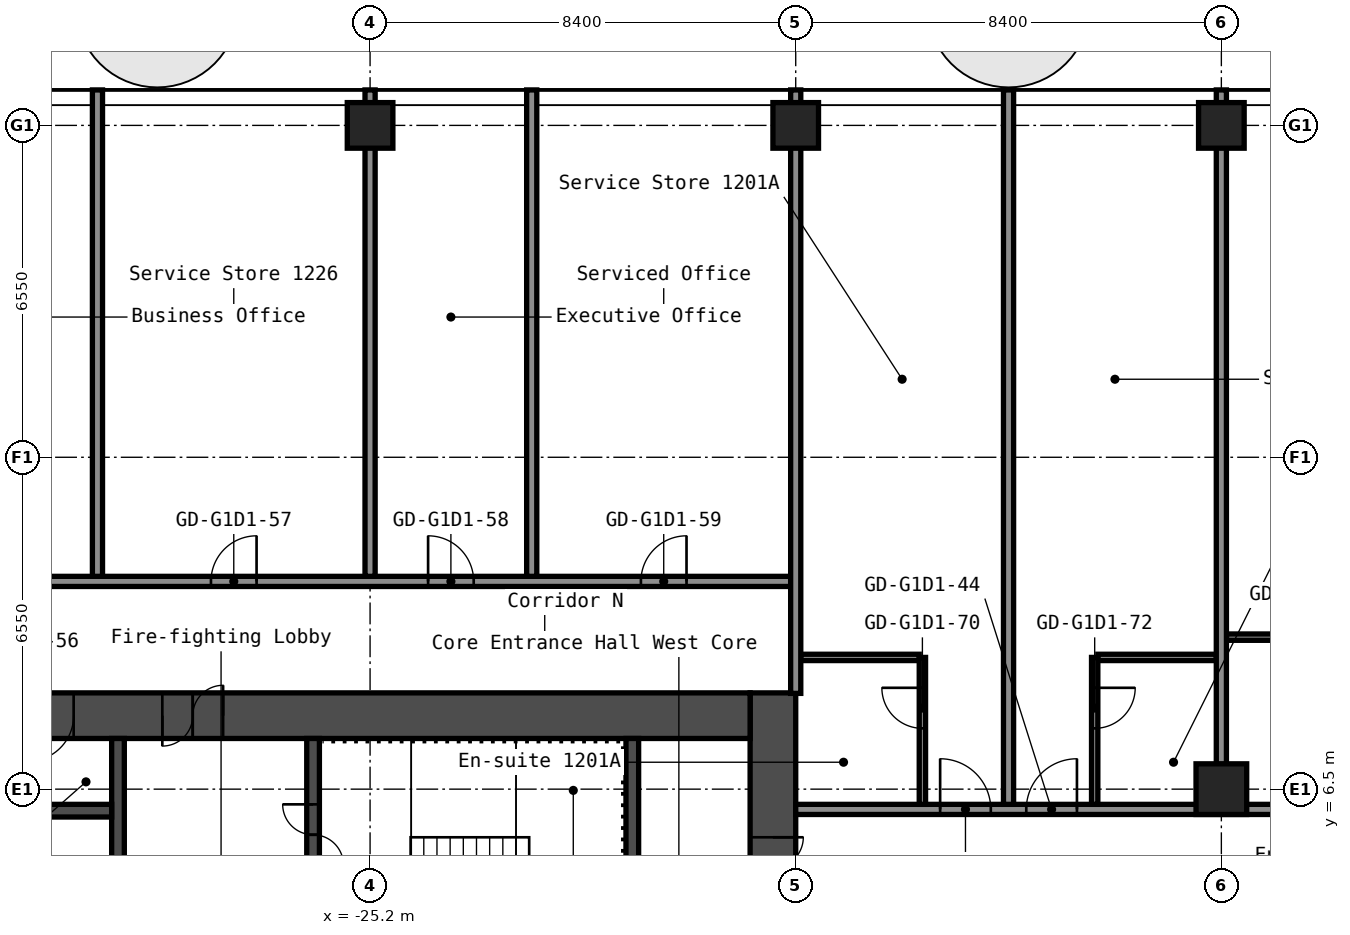
"""IFC4 building model, lengths in metres.
Left out: names, types, materials, properties, quantities, classifications, styles, units other than length and angle.
Written with IfcOpenShell. Run it as: python <this file> out.ifc"""

import sys

from ifc_helpers import new_model, si_unit, direction, frame, frame_2d, origin, origin_2d, place, context, subcontext, project, spatial, rectangle, hollow_rectangle, extrude, element, fill, save


model = new_model("IFC4")
c1 = context("Model", 3, precision=1e-05, world=origin(), true_north=direction((0.0, 1.0)))
c2 = subcontext(c1, "Body", "Model", "MODEL_VIEW")
j1 = project(units=[si_unit("LENGTHUNIT", "METRE"), si_unit("PLANEANGLEUNIT", "RADIAN")], contexts=[c1])
p1 = place(None, origin())
s1 = spatial("IfcSite", under=j1, at=p1, CompositionType="ELEMENT")
p2 = place(p1, origin())
s2 = spatial("IfcBuilding", under=s1, at=p2, CompositionType="ELEMENT")
p3 = place(p2, frame((0.0, 0.0, 45.4)))
s3 = spatial("IfcBuildingStorey", under=s2, at=p3, CompositionType="ELEMENT", Elevation=45.4)
for number, where, z_axis, x_axis in (
    (1, (-25.2, 19.6, 0.0), (0.0, 0.0, 1.0), (1.0, 0.0, 0.0)),
    (2, (-16.8, 19.6, 0.0), (0.0, 0.0, 1.0), (1.0, 0.0, 0.0)),
):
    element("IfcColumn", number, at=place(p3, frame(where, z_axis=z_axis, x_axis=x_axis)), inside=s3, PredefinedType="COLUMN", context=c2, shape_type="SweptSolid", body=[
        extrude(hollow_rectangle(XDim=0.9, YDim=0.9, WallThickness=0.036, at=origin_2d()), origin(), (0.0, 0.0, 1.0), 2.8),
    ])
p4 = place(p3, frame((-8.4, 6.5, 0.0), z_axis=(0.0, 0.0, 1.0), x_axis=(1.0, 0.0, 0.0)))
e3 = element("IfcColumn", 3, at=p4, inside=s3, PredefinedType="COLUMN", context=c2, shape_type="SweptSolid", body=[
    extrude(hollow_rectangle(XDim=1.0, YDim=1.0, WallThickness=0.04, at=origin_2d()), origin(), (0.0, 0.0, 1.0), 2.8),
])
p5 = place(p3, frame((-8.4, 19.6, 0.0), z_axis=(0.0, 0.0, 1.0), x_axis=(1.0, 0.0, 0.0)))
e4 = element("IfcColumn", 4, at=p5, inside=s3, PredefinedType="COLUMN", context=c2, shape_type="SweptSolid", body=[
    extrude(hollow_rectangle(XDim=0.9, YDim=0.9, WallThickness=0.036, at=origin_2d()), origin(), (0.0, 0.0, 1.0), 2.8),
])
p6 = place(p3, frame((-17.25, -8.4, 0.0), z_axis=(0.0, 0.0, 1.0), x_axis=(0.0, 1.0, 0.0)))
e5 = element("IfcWall", 5, at=p6, inside=s3, PredefinedType="SHEAR", context=c2, shape_type="SweptSolid", body=[
    extrude(rectangle(XDim=16.8, YDim=0.9, at=frame_2d((8.4, 0.0))), origin(), (0.0, 0.0, 1.0), 2.8),
])
p7 = place(p6, frame((12.75, 0.0, 0.0)))
e6 = element("IfcOpeningElement", 6, at=p7, cuts=e5, PredefinedType="OPENING", context=c2, shape_type="SweptSolid", body=[
    extrude(rectangle(XDim=1.2, YDim=2.1, at=frame_2d((0.6, 1.05))), frame((0.0, 0.46, 0.0), z_axis=(0.0, -1.0, 0.0), x_axis=(1.0, 0.0, 0.0)), (0.0, 0.0, 1.0), 0.92),
])
p8 = place(p6, frame((2.85, 0.0, 0.0)))
e7 = element("IfcOpeningElement", 7, at=p8, cuts=e5, PredefinedType="OPENING", context=c2, shape_type="SweptSolid", body=[
    extrude(rectangle(XDim=1.2, YDim=2.1, at=frame_2d((0.6, 1.05))), frame((0.0, 0.46, 0.0), z_axis=(0.0, -1.0, 0.0), x_axis=(1.0, 0.0, 0.0)), (0.0, 0.0, 1.0), 0.92),
])
p9 = place(p3, frame((-32.7, 7.95, 0.0), z_axis=(0.0, 0.0, 1.0), x_axis=(1.0, 0.0, 0.0)))
e8 = element("IfcWall", 8, at=p9, inside=s3, PredefinedType="SHEAR", context=c2, shape_type="SweptSolid", body=[
    extrude(rectangle(XDim=15.0, YDim=0.9, at=frame_2d((7.5, 0.0))), origin(), (0.0, 0.0, 1.0), 2.8),
])
p10 = place(p9, frame((3.4, 0.0, 0.0)))
e9 = element("IfcOpeningElement", 9, at=p10, cuts=e8, PredefinedType="OPENING", context=c2, shape_type="SweptSolid", body=[
    extrude(rectangle(XDim=1.2, YDim=2.1, at=frame_2d((0.6, 1.05))), frame((0.0, 0.46, 0.0), z_axis=(0.0, -1.0, 0.0), x_axis=(1.0, 0.0, 0.0)), (0.0, 0.0, 1.0), 0.92),
])
p11 = place(p9, frame((0.75, 0.0, 0.0)))
e10 = element("IfcOpeningElement", 10, at=p11, cuts=e8, PredefinedType="OPENING", context=c2, shape_type="SweptSolid", body=[
    extrude(rectangle(XDim=0.9, YDim=2.1, at=frame_2d((0.45, 1.05))), frame((0.0, 0.46, 0.0), z_axis=(0.0, -1.0, 0.0), x_axis=(1.0, 0.0, 0.0)), (0.0, 0.0, 1.0), 0.92),
])
p12 = place(p3, frame((-20.025, 1.2, 0.0), z_axis=(0.0, 0.0, 1.0), x_axis=(0.0, 1.0, 0.0)))
e11 = element("IfcWall", 11, at=p12, inside=s3, PredefinedType="SHEAR", context=c2, shape_type="SweptSolid", body=[
    extrude(rectangle(XDim=6.3, YDim=0.25, at=frame_2d((3.15, 0.0))), origin(), (0.0, 0.0, 1.0), 2.8),
])
p13 = place(p3, frame((-26.325, 3.75, 0.0), z_axis=(0.0, 0.0, 1.0), x_axis=(0.0, 1.0, 0.0)))
e12 = element("IfcWall", 12, at=p13, inside=s3, PredefinedType="SHEAR", context=c2, shape_type="SweptSolid", body=[
    extrude(rectangle(XDim=3.75, YDim=0.25, at=frame_2d((1.875, 0.0))), origin(), (0.0, 0.0, 1.0), 2.8),
])
p14 = place(p13, frame((1.25, 0.0, 0.0)))
e13 = element("IfcOpeningElement", 13, at=p14, cuts=e12, PredefinedType="OPENING", context=c2, shape_type="SweptSolid", body=[
    extrude(rectangle(XDim=1.2, YDim=2.1, at=frame_2d((0.6, 1.05))), frame((0.0, 0.135, 0.0), z_axis=(0.0, -1.0, 0.0), x_axis=(1.0, 0.0, 0.0)), (0.0, 0.0, 1.0), 0.27),
])
p15 = place(p3, frame((-30.175, 1.45, 0.0), z_axis=(0.0, 0.0, 1.0), x_axis=(0.0, 1.0, 0.0)))
e14 = element("IfcWall", 14, at=p15, inside=s3, PredefinedType="SHEAR", context=c2, shape_type="SweptSolid", body=[
    extrude(rectangle(XDim=6.05, YDim=0.25, at=frame_2d((3.025, 0.0))), origin(), (0.0, 0.0, 1.0), 2.8),
])
p16 = place(p15, frame((2.625, 0.0, 0.0)))
e15 = element("IfcOpeningElement", 15, at=p16, cuts=e14, PredefinedType="OPENING", context=c2, shape_type="SweptSolid", body=[
    extrude(rectangle(XDim=1.1, YDim=2.1, at=frame_2d((0.55, 1.05))), frame((0.0, 0.135, 0.0), z_axis=(0.0, -1.0, 0.0), x_axis=(1.0, 0.0, 0.0)), (0.0, 0.0, 1.0), 0.27),
])
p17 = place(p3, frame((-32.7, 6.075, 0.0), z_axis=(0.0, 0.0, 1.0), x_axis=(1.0, 0.0, 0.0)))
e16 = element("IfcWall", 16, at=p17, inside=s3, PredefinedType="SHEAR", context=c2, shape_type="SweptSolid", body=[
    extrude(rectangle(XDim=2.4, YDim=0.25, at=frame_2d((1.2, 0.0))), origin(), (0.0, 0.0, 1.0), 2.8),
])
p18 = place(p3, frame((-16.8, 6.1, 0.0), z_axis=(0.0, 0.0, 1.0), x_axis=(1.0, 0.0, 0.0)))
e17 = element("IfcWall", 17, at=p18, inside=s3, PredefinedType="PARTITIONING", context=c2, shape_type="SweptSolid", body=[
    extrude(rectangle(XDim=33.6, YDim=0.2, at=frame_2d((16.8, 0.0))), origin(), (0.0, 0.0, 1.0), 2.8),
])
p19 = place(p18, frame((2.85, 0.0, 0.0)))
e18 = element("IfcOpeningElement", 18, at=p19, cuts=e17, PredefinedType="OPENING", context=c2, shape_type="SweptSolid", body=[
    extrude(rectangle(XDim=1.0, YDim=2.1, at=frame_2d((0.5, 1.05))), frame((0.0, 0.11, 0.0), z_axis=(0.0, -1.0, 0.0), x_axis=(1.0, 0.0, 0.0)), (0.0, 0.0, 1.0), 0.22),
])
p20 = place(p18, frame((4.55, 0.0, 0.0)))
e19 = element("IfcOpeningElement", 19, at=p20, cuts=e17, PredefinedType="OPENING", context=c2, shape_type="SweptSolid", body=[
    extrude(rectangle(XDim=1.0, YDim=2.1, at=frame_2d((0.5, 1.05))), frame((0.0, 0.11, 0.0), z_axis=(0.0, -1.0, 0.0), x_axis=(1.0, 0.0, 0.0)), (0.0, 0.0, 1.0), 0.22),
])
p21 = place(p18, frame((13.8, 0.0, 0.0)))
e20 = element("IfcOpeningElement", 20, at=p21, cuts=e17, PredefinedType="OPENING", context=c2, shape_type="SweptSolid", body=[
    extrude(rectangle(XDim=1.0, YDim=2.1, at=frame_2d((0.5, 1.05))), frame((0.0, 0.11, 0.0), z_axis=(0.0, -1.0, 0.0), x_axis=(1.0, 0.0, 0.0)), (0.0, 0.0, 1.0), 0.22),
])
p22 = place(p18, frame((18.7, 0.0, 0.0)))
e21 = element("IfcOpeningElement", 21, at=p22, cuts=e17, PredefinedType="OPENING", context=c2, shape_type="SweptSolid", body=[
    extrude(rectangle(XDim=1.0, YDim=2.1, at=frame_2d((0.5, 1.05))), frame((0.0, 0.11, 0.0), z_axis=(0.0, -1.0, 0.0), x_axis=(1.0, 0.0, 0.0)), (0.0, 0.0, 1.0), 0.22),
])
p23 = place(p18, frame((30.6, 0.0, 0.0)))
e22 = element("IfcOpeningElement", 22, at=p23, cuts=e17, PredefinedType="OPENING", context=c2, shape_type="SweptSolid", body=[
    extrude(rectangle(XDim=1.0, YDim=2.1, at=frame_2d((0.5, 1.05))), frame((0.0, 0.11, 0.0), z_axis=(0.0, -1.0, 0.0), x_axis=(1.0, 0.0, 0.0)), (0.0, 0.0, 1.0), 0.22),
])
for number, where, z_axis, x_axis in (
    (23, (-16.7, 9.1, 0.0), (0.0, 0.0, 1.0), (1.0, 0.0, 0.0)),
    (24, (-10.837, 9.1, 0.0), (0.0, 0.0, 1.0), (1.0, 0.0, 0.0)),
):
    element("IfcWall", number, at=place(p3, frame(where, z_axis=z_axis, x_axis=x_axis)), inside=s3, PredefinedType="PARTITIONING", context=c2, shape_type="SweptSolid", body=[
        extrude(rectangle(XDim=2.337, YDim=0.125, at=frame_2d((1.169, 0.0))), origin(), (0.0, 0.0, 1.0), 2.8),
    ])
p24 = place(p3, frame((-8.3, 9.5, 0.0), z_axis=(0.0, 0.0, 1.0), x_axis=(1.0, 0.0, 0.0)))
e25 = element("IfcWall", 25, at=p24, inside=s3, PredefinedType="PARTITIONING", context=c2, shape_type="SweptSolid", body=[
    extrude(rectangle(XDim=3.238, YDim=0.125, at=frame_2d((1.619, 0.0))), origin(), (0.0, 0.0, 1.0), 2.8),
])
p25 = place(p24, frame((1.2, 0.0, 0.0)))
e26 = element("IfcOpeningElement", 26, at=p25, cuts=e25, PredefinedType="OPENING", context=c2, shape_type="SweptSolid", body=[
    extrude(rectangle(XDim=0.8, YDim=2.1, at=frame_2d((0.4, 1.05))), frame((0.0, 0.073, 0.0), z_axis=(0.0, -1.0, 0.0), x_axis=(1.0, 0.0, 0.0)), (0.0, 0.0, 1.0), 0.145),
])
p26 = place(p3, frame((-51.1, 10.6, 0.0), z_axis=(0.0, 0.0, 1.0), x_axis=(1.0, 0.0, 0.0)))
e27 = element("IfcWall", 27, at=p26, inside=s3, PredefinedType="PARTITIONING", context=c2, shape_type="SweptSolid", body=[
    extrude(rectangle(XDim=34.3, YDim=0.2, at=frame_2d((17.15, 0.0))), origin(), (0.0, 0.0, 1.0), 2.8),
])
p27 = place(p26, frame((2.665, 0.0, 0.0)))
e28 = element("IfcOpeningElement", 28, at=p27, cuts=e27, PredefinedType="OPENING", context=c2, shape_type="SweptSolid", body=[
    extrude(rectangle(XDim=0.9, YDim=2.1, at=frame_2d((0.45, 1.05))), frame((0.0, 0.11, 0.0), z_axis=(0.0, -1.0, 0.0), x_axis=(1.0, 0.0, 0.0)), (0.0, 0.0, 1.0), 0.22),
])
p28 = place(p26, frame((7.065, 0.0, 0.0)))
e29 = element("IfcOpeningElement", 29, at=p28, cuts=e27, PredefinedType="OPENING", context=c2, shape_type="SweptSolid", body=[
    extrude(rectangle(XDim=0.9, YDim=2.1, at=frame_2d((0.45, 1.05))), frame((0.0, 0.11, 0.0), z_axis=(0.0, -1.0, 0.0), x_axis=(1.0, 0.0, 0.0)), (0.0, 0.0, 1.0), 0.22),
])
p29 = place(p26, frame((12.8, 0.0, 0.0)))
e30 = element("IfcOpeningElement", 30, at=p29, cuts=e27, PredefinedType="OPENING", context=c2, shape_type="SweptSolid", body=[
    extrude(rectangle(XDim=1.0, YDim=2.1, at=frame_2d((0.5, 1.05))), frame((0.0, 0.11, 0.0), z_axis=(0.0, -1.0, 0.0), x_axis=(1.0, 0.0, 0.0)), (0.0, 0.0, 1.0), 0.22),
])
p30 = place(p26, frame((18.56, 0.0, 0.0)))
e31 = element("IfcOpeningElement", 31, at=p30, cuts=e27, PredefinedType="OPENING", context=c2, shape_type="SweptSolid", body=[
    extrude(rectangle(XDim=0.9, YDim=2.1, at=frame_2d((0.45, 1.05))), frame((0.0, 0.11, 0.0), z_axis=(0.0, -1.0, 0.0), x_axis=(1.0, 0.0, 0.0)), (0.0, 0.0, 1.0), 0.22),
])
p31 = place(p26, frame((22.76, 0.0, 0.0)))
e32 = element("IfcOpeningElement", 32, at=p31, cuts=e27, PredefinedType="OPENING", context=c2, shape_type="SweptSolid", body=[
    extrude(rectangle(XDim=0.9, YDim=2.1, at=frame_2d((0.45, 1.05))), frame((0.0, 0.11, 0.0), z_axis=(0.0, -1.0, 0.0), x_axis=(1.0, 0.0, 0.0)), (0.0, 0.0, 1.0), 0.22),
])
p32 = place(p26, frame((27.045, 0.0, 0.0)))
e33 = element("IfcOpeningElement", 33, at=p32, cuts=e27, PredefinedType="OPENING", context=c2, shape_type="SweptSolid", body=[
    extrude(rectangle(XDim=0.9, YDim=2.1, at=frame_2d((0.45, 1.05))), frame((0.0, 0.11, 0.0), z_axis=(0.0, -1.0, 0.0), x_axis=(1.0, 0.0, 0.0)), (0.0, 0.0, 1.0), 0.22),
])
p33 = place(p26, frame((31.245, 0.0, 0.0)))
e34 = element("IfcOpeningElement", 34, at=p33, cuts=e27, PredefinedType="OPENING", context=c2, shape_type="SweptSolid", body=[
    extrude(rectangle(XDim=0.9, YDim=2.1, at=frame_2d((0.45, 1.05))), frame((0.0, 0.11, 0.0), z_axis=(0.0, -1.0, 0.0), x_axis=(1.0, 0.0, 0.0)), (0.0, 0.0, 1.0), 0.22),
])
for number, where, z_axis, x_axis in (
    (35, (-30.58, 10.7, 0.0), (0.0, 0.0, 1.0), (0.0, 1.0, 0.0)),
    (36, (-25.2, 10.7, 0.0), (0.0, 0.0, 1.0), (0.0, 1.0, 0.0)),
    (37, (-22.01, 10.7, 0.0), (0.0, 0.0, 1.0), (0.0, 1.0, 0.0)),
):
    element("IfcWall", number, at=place(p3, frame(where, z_axis=z_axis, x_axis=x_axis)), inside=s3, PredefinedType="PARTITIONING", context=c2, shape_type="SweptSolid", body=[
        extrude(rectangle(XDim=9.6, YDim=0.2, at=frame_2d((4.8, 0.0))), origin(), (0.0, 0.0, 1.0), 2.8),
    ])
p34 = place(p3, frame((-16.8, 8.39, 0.0), z_axis=(0.0, 0.0, 1.0), x_axis=(0.0, 1.0, 0.0)))
e38 = element("IfcWall", 38, at=p34, inside=s3, PredefinedType="PARTITIONING", context=c2, shape_type="SweptSolid", body=[
    extrude(rectangle(XDim=11.91, YDim=0.2, at=frame_2d((5.955, 0.0))), origin(), (0.0, 0.0, 1.0), 2.8),
])
p35 = place(p3, frame((-14.3, 6.2, 0.0), z_axis=(0.0, 0.0, 1.0), x_axis=(0.0, 1.0, 0.0)))
e39 = element("IfcWall", 39, at=p35, inside=s3, PredefinedType="PARTITIONING", context=c2, shape_type="SweptSolid", body=[
    extrude(rectangle(XDim=2.9, YDim=0.125, at=frame_2d((1.45, 0.0))), origin(), (0.0, 0.0, 1.0), 2.8),
])
p36 = place(p35, frame((1.5, 0.0, 0.0)))
e40 = element("IfcOpeningElement", 40, at=p36, cuts=e39, PredefinedType="OPENING", context=c2, shape_type="SweptSolid", body=[
    extrude(rectangle(XDim=0.8, YDim=2.1, at=frame_2d((0.4, 1.05))), frame((0.0, 0.073, 0.0), z_axis=(0.0, -1.0, 0.0), x_axis=(1.0, 0.0, 0.0)), (0.0, 0.0, 1.0), 0.145),
])
p37 = place(p3, frame((-12.6, 6.2, 0.0), z_axis=(0.0, 0.0, 1.0), x_axis=(0.0, 1.0, 0.0)))
e41 = element("IfcWall", 41, at=p37, inside=s3, PredefinedType="PARTITIONING", context=c2, shape_type="SweptSolid", body=[
    extrude(rectangle(XDim=14.1, YDim=0.2, at=frame_2d((7.05, 0.0))), origin(), (0.0, 0.0, 1.0), 2.8),
])
p38 = place(p3, frame((-10.9, 6.2, 0.0), z_axis=(0.0, 0.0, 1.0), x_axis=(0.0, 1.0, 0.0)))
e42 = element("IfcWall", 42, at=p38, inside=s3, PredefinedType="PARTITIONING", context=c2, shape_type="SweptSolid", body=[
    extrude(rectangle(XDim=2.9, YDim=0.125, at=frame_2d((1.45, 0.0))), origin(), (0.0, 0.0, 1.0), 2.8),
])
p39 = place(p38, frame((1.5, 0.0, 0.0)))
e43 = element("IfcOpeningElement", 43, at=p39, cuts=e42, PredefinedType="OPENING", context=c2, shape_type="SweptSolid", body=[
    extrude(rectangle(XDim=0.8, YDim=2.1, at=frame_2d((0.4, 1.05))), frame((0.0, 0.073, 0.0), z_axis=(0.0, -1.0, 0.0), x_axis=(1.0, 0.0, 0.0)), (0.0, 0.0, 1.0), 0.145),
])
p40 = place(p3, frame((-8.4, 6.99, 0.0), z_axis=(0.0, 0.0, 1.0), x_axis=(0.0, 1.0, 0.0)))
e44 = element("IfcWall", 44, at=p40, inside=s3, PredefinedType="PARTITIONING", context=c2, shape_type="SweptSolid", body=[
    extrude(rectangle(XDim=13.31, YDim=0.2, at=frame_2d((6.655, 0.0))), origin(), (0.0, 0.0, 1.0), 2.8),
])
p41 = place(p7, origin())
e45 = element("IfcDoor", 45, at=p41, inside=s3, OperationType="DOUBLE_DOOR_SINGLE_SWING", PredefinedType="DOOR", context=c2, shape_type="SweptSolid", body=[
    extrude(rectangle(XDim=1.2, YDim=2.1, at=frame_2d((0.6, 1.05))), frame((0.0, 0.025, 0.0), z_axis=(0.0, -1.0, 0.0), x_axis=(1.0, 0.0, 0.0)), (0.0, 0.0, 1.0), 0.05),
])
fill(e6, e45)
p42 = place(p10, origin())
e46 = element("IfcDoor", 46, at=p42, inside=s3, OperationType="DOUBLE_DOOR_SINGLE_SWING", PredefinedType="DOOR", context=c2, shape_type="SweptSolid", body=[
    extrude(rectangle(XDim=1.2, YDim=2.1, at=frame_2d((0.6, 1.05))), frame((0.0, 0.025, 0.0), z_axis=(0.0, -1.0, 0.0), x_axis=(1.0, 0.0, 0.0)), (0.0, 0.0, 1.0), 0.05),
])
fill(e9, e46)
p43 = place(p11, origin())
e47 = element("IfcDoor", 47, at=p43, inside=s3, OperationType="SINGLE_SWING_LEFT", PredefinedType="DOOR", context=c2, shape_type="SweptSolid", body=[
    extrude(rectangle(XDim=0.9, YDim=2.1, at=frame_2d((0.45, 1.05))), frame((0.0, 0.025, 0.0), z_axis=(0.0, -1.0, 0.0), x_axis=(1.0, 0.0, 0.0)), (0.0, 0.0, 1.0), 0.05),
])
fill(e10, e47)
p44 = place(p14, origin())
e48 = element("IfcDoor", 48, at=p44, inside=s3, OperationType="DOUBLE_DOOR_SINGLE_SWING", PredefinedType="DOOR", context=c2, shape_type="SweptSolid", body=[
    extrude(rectangle(XDim=1.2, YDim=2.1, at=frame_2d((0.6, 1.05))), frame((0.0, 0.025, 0.0), z_axis=(0.0, -1.0, 0.0), x_axis=(1.0, 0.0, 0.0)), (0.0, 0.0, 1.0), 0.05),
])
fill(e13, e48)
p45 = place(p19, origin())
e49 = element("IfcDoor", 49, at=p45, inside=s3, OperationType="SINGLE_SWING_RIGHT", PredefinedType="DOOR", context=c2, shape_type="SweptSolid", body=[
    extrude(rectangle(XDim=1.0, YDim=2.1, at=frame_2d((0.5, 1.05))), frame((0.0, 0.025, 0.0), z_axis=(0.0, -1.0, 0.0), x_axis=(1.0, 0.0, 0.0)), (0.0, 0.0, 1.0), 0.05),
])
fill(e18, e49)
p46 = place(p20, origin())
e50 = element("IfcDoor", 50, at=p46, inside=s3, OperationType="SINGLE_SWING_LEFT", PredefinedType="DOOR", context=c2, shape_type="SweptSolid", body=[
    extrude(rectangle(XDim=1.0, YDim=2.1, at=frame_2d((0.5, 1.05))), frame((0.0, 0.025, 0.0), z_axis=(0.0, -1.0, 0.0), x_axis=(1.0, 0.0, 0.0)), (0.0, 0.0, 1.0), 0.05),
])
fill(e19, e50)
p47 = place(p31, origin())
e51 = element("IfcDoor", 51, at=p47, inside=s3, OperationType="SINGLE_SWING_LEFT", PredefinedType="DOOR", context=c2, shape_type="SweptSolid", body=[
    extrude(rectangle(XDim=0.9, YDim=2.1, at=frame_2d((0.45, 1.05))), frame((0.0, 0.025, 0.0), z_axis=(0.0, -1.0, 0.0), x_axis=(1.0, 0.0, 0.0)), (0.0, 0.0, 1.0), 0.05),
])
fill(e32, e51)
p48 = place(p32, origin())
e52 = element("IfcDoor", 52, at=p48, inside=s3, OperationType="SINGLE_SWING_RIGHT", PredefinedType="DOOR", context=c2, shape_type="SweptSolid", body=[
    extrude(rectangle(XDim=0.9, YDim=2.1, at=frame_2d((0.45, 1.05))), frame((0.0, 0.025, 0.0), z_axis=(0.0, -1.0, 0.0), x_axis=(1.0, 0.0, 0.0)), (0.0, 0.0, 1.0), 0.05),
])
fill(e33, e52)
p49 = place(p33, origin())
e53 = element("IfcDoor", 53, at=p49, inside=s3, OperationType="SINGLE_SWING_LEFT", PredefinedType="DOOR", context=c2, shape_type="SweptSolid", body=[
    extrude(rectangle(XDim=0.9, YDim=2.1, at=frame_2d((0.45, 1.05))), frame((0.0, 0.025, 0.0), z_axis=(0.0, -1.0, 0.0), x_axis=(1.0, 0.0, 0.0)), (0.0, 0.0, 1.0), 0.05),
])
fill(e34, e53)
p50 = place(p36, origin())
e54 = element("IfcDoor", 54, at=p50, inside=s3, OperationType="SINGLE_SWING_LEFT", PredefinedType="DOOR", context=c2, shape_type="SweptSolid", body=[
    extrude(rectangle(XDim=0.8, YDim=2.1, at=frame_2d((0.4, 1.05))), frame((0.0, 0.025, 0.0), z_axis=(0.0, -1.0, 0.0), x_axis=(1.0, 0.0, 0.0)), (0.0, 0.0, 1.0), 0.05),
])
fill(e40, e54)
p51 = place(p39, origin())
e55 = element("IfcDoor", 55, at=p51, inside=s3, OperationType="SINGLE_SWING_RIGHT", PredefinedType="DOOR", context=c2, shape_type="SweptSolid", body=[
    extrude(rectangle(XDim=0.8, YDim=2.1, at=frame_2d((0.4, 1.05))), frame((0.0, 0.025, 0.0), z_axis=(0.0, -1.0, 0.0), x_axis=(1.0, 0.0, 0.0)), (0.0, 0.0, 1.0), 0.05),
])
fill(e43, e55)
save(model, sys.argv[1])
